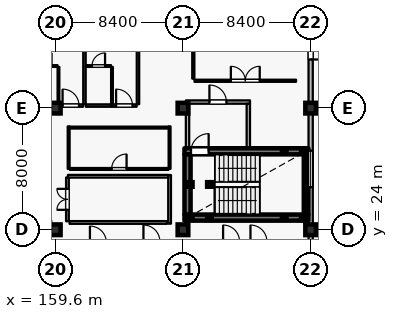
"""IFC4 building model, lengths in metres.
Left out: names, types, materials, properties, quantities, classifications, styles, units other than length and angle.
Written with IfcOpenShell. Run it as: python <this file> out.ifc"""

import sys

from ifc_helpers import new_model, si_unit, direction, frame, frame_2d, origin, origin_2d, place, context, subcontext, project, spatial, rectangle, hollow_rectangle, extrude, element, fill, save


model = new_model("IFC4")
c1 = context("Model", 3, precision=1e-05, world=origin(), true_north=direction((0.0, 1.0)))
c2 = subcontext(c1, "Body", "Model", "MODEL_VIEW")
j1 = project(units=[si_unit("LENGTHUNIT", "METRE"), si_unit("PLANEANGLEUNIT", "RADIAN")], contexts=[c1])
p1 = place(None, origin())
s1 = spatial("IfcSite", under=j1, at=p1, CompositionType="ELEMENT")
p2 = place(p1, origin())
s2 = spatial("IfcBuilding", under=s1, at=p2, CompositionType="ELEMENT")
p3 = place(p2, frame((0.0, 0.0, 28.8)))
s3 = spatial("IfcBuildingStorey", under=s2, at=p3, CompositionType="ELEMENT", Elevation=28.8)
for number, where, z_axis, x_axis in (
    (1, (159.6, 24.0, 0.0), (0.0, 0.0, 1.0), (1.0, 0.0, 0.0)),
    (2, (168.0, 32.0, 0.0), (0.0, 0.0, 1.0), (1.0, 0.0, 0.0)),
    (3, (176.4, 32.0, 0.0), (0.0, 0.0, 1.0), (1.0, 0.0, 0.0)),
    (4, (159.6, 32.0, 0.0), (0.0, 0.0, 1.0), (1.0, 0.0, 0.0)),
    (5, (168.0, 24.0, 0.0), (0.0, 0.0, 1.0), (1.0, 0.0, 0.0)),
    (6, (176.4, 24.0, 0.0), (0.0, 0.0, 1.0), (1.0, 0.0, 0.0)),
):
    element("IfcColumn", number, at=place(p3, frame(where, z_axis=z_axis, x_axis=x_axis)), inside=s3, PredefinedType="COLUMN", context=c2, shape_type="SweptSolid", body=[
        extrude(rectangle(XDim=0.7, YDim=0.7, at=origin_2d()), origin(), (0.0, 0.0, 1.0), 3.6),
    ])
p4 = place(p3, frame((176.4, 39.65, 0.0), z_axis=(0.0, 0.0, 1.0), x_axis=(0.0, -1.0, 0.0)))
e7 = element("IfcWall", 7, at=p4, inside=s3, PredefinedType="SOLIDWALL", context=c2, shape_type="SweptSolid", body=[
    extrude(rectangle(XDim=7.3, YDim=0.28, at=frame_2d((3.65, 0.0))), origin(), (0.0, 0.0, 1.0), 2.7),
])
p5 = place(p4, frame((2.85, 0.0, 0.0)))
e8 = element("IfcOpeningElement", 8, at=p5, cuts=e7, PredefinedType="OPENING", context=c2, shape_type="SweptSolid", body=[
    extrude(rectangle(XDim=1.6, YDim=2.25, at=frame_2d((0.8, 1.125))), frame((0.0, 0.15, 0.0), z_axis=(0.0, -1.0, 0.0), x_axis=(1.0, 0.0, 0.0)), (0.0, 0.0, 1.0), 0.3),
])
p6 = place(p3, frame((176.4, 31.65, 0.0), z_axis=(0.0, 0.0, 1.0), x_axis=(0.0, -1.0, 0.0)))
e9 = element("IfcWall", 9, at=p6, inside=s3, PredefinedType="SOLIDWALL", context=c2, shape_type="SweptSolid", body=[
    extrude(rectangle(XDim=7.3, YDim=0.28, at=frame_2d((3.65, 0.0))), origin(), (0.0, 0.0, 1.0), 2.7),
])
p7 = place(p6, frame((2.45, 0.0, 0.5)))
e10 = element("IfcOpeningElement", 10, at=p7, cuts=e9, PredefinedType="OPENING", context=c2, shape_type="SweptSolid", body=[
    extrude(rectangle(XDim=2.4, YDim=1.65, at=frame_2d((1.2, 0.825))), frame((0.0, 0.15, 0.0), z_axis=(0.0, -1.0, 0.0), x_axis=(1.0, 0.0, 0.0)), (0.0, 0.0, 1.0), 0.3),
])
p8 = place(p3, frame((176.4, 23.65, 0.0), z_axis=(0.0, 0.0, 1.0), x_axis=(0.0, -1.0, 0.0)))
e11 = element("IfcWall", 11, at=p8, inside=s3, PredefinedType="SOLIDWALL", context=c2, shape_type="SweptSolid", body=[
    extrude(rectangle(XDim=7.3, YDim=0.28, at=frame_2d((3.65, 0.0))), origin(), (0.0, 0.0, 1.0), 2.7),
])
p9 = place(p8, frame((2.45, 0.0, 0.5)))
e12 = element("IfcOpeningElement", 12, at=p9, cuts=e11, PredefinedType="OPENING", context=c2, shape_type="SweptSolid", body=[
    extrude(rectangle(XDim=2.4, YDim=1.65, at=frame_2d((1.2, 0.825))), frame((0.0, 0.15, 0.0), z_axis=(0.0, -1.0, 0.0), x_axis=(1.0, 0.0, 0.0)), (0.0, 0.0, 1.0), 0.3),
])
p10 = place(p3, frame((168.1, 24.8, 0.0), z_axis=(0.0, 0.0, 1.0), x_axis=(1.0, 0.0, 0.0)))
e13 = element("IfcWall", 13, at=p10, inside=s3, PredefinedType="SHEAR", context=c2, shape_type="SweptSolid", body=[
    extrude(rectangle(XDim=8.15, YDim=0.4, at=frame_2d((4.075, 0.0))), origin(), (0.0, 0.0, 1.0), 3.365),
])
p11 = place(p3, frame((176.1, 25.005, 0.0), z_axis=(0.0, 0.0, 1.0), x_axis=(0.0, 1.0, 0.0)))
e14 = element("IfcWall", 14, at=p11, inside=s3, PredefinedType="SHEAR", context=c2, shape_type="SweptSolid", body=[
    extrude(rectangle(XDim=3.95, YDim=0.3, at=frame_2d((1.975, 0.0))), origin(), (0.0, 0.0, 1.0), 3.365),
])
p12 = place(p3, frame((168.1, 29.16, 0.0), z_axis=(0.0, 0.0, 1.0), x_axis=(1.0, 0.0, 0.0)))
e15 = element("IfcWall", 15, at=p12, inside=s3, PredefinedType="SHEAR", context=c2, shape_type="SweptSolid", body=[
    extrude(rectangle(XDim=8.15, YDim=0.4, at=frame_2d((4.075, 0.0))), origin(), (0.0, 0.0, 1.0), 3.365),
])
p13 = place(p12, frame((0.43, 0.0, 0.0)))
e16 = element("IfcOpeningElement", 16, at=p13, cuts=e15, PredefinedType="OPENING", context=c2, shape_type="SweptSolid", body=[
    extrude(rectangle(XDim=1.16, YDim=2.2, at=frame_2d((0.58, 1.1))), frame((0.0, 0.21, 0.0), z_axis=(0.0, -1.0, 0.0), x_axis=(1.0, 0.0, 0.0)), (0.0, 0.0, 1.0), 0.42),
])
p14 = place(p3, frame((168.3, 25.005, 0.0), z_axis=(0.0, 0.0, 1.0), x_axis=(0.0, 1.0, 0.0)))
e17 = element("IfcWall", 17, at=p14, inside=s3, PredefinedType="SHEAR", context=c2, shape_type="SweptSolid", body=[
    extrude(rectangle(XDim=3.95, YDim=0.4, at=frame_2d((1.975, 0.0))), origin(), (0.0, 0.0, 1.0), 3.365),
])
p15 = place(p3, frame((168.3, 29.365, 0.0), z_axis=(0.0, 0.0, 1.0), x_axis=(0.0, 1.0, 0.0)))
e18 = element("IfcWall", 18, at=p15, inside=s3, PredefinedType="PARTITIONING", context=c2, shape_type="SweptSolid", body=[
    extrude(rectangle(XDim=2.92, YDim=0.22, at=frame_2d((1.46, 0.0))), origin(), (0.0, 0.0, 1.0), 3.365),
])
p16 = place(p3, frame((168.19, 32.4, 0.0), z_axis=(0.0, 0.0, 1.0), x_axis=(1.0, 0.0, 0.0)))
e19 = element("IfcWall", 19, at=p16, inside=s3, PredefinedType="PARTITIONING", context=c2, shape_type="SweptSolid", body=[
    extrude(rectangle(XDim=4.22, YDim=0.22, at=frame_2d((2.11, 0.0))), origin(), (0.0, 0.0, 1.0), 3.365),
])
p17 = place(p16, frame((1.55, 0.0, 0.0)))
e20 = element("IfcOpeningElement", 20, at=p17, cuts=e19, PredefinedType="OPENING", context=c2, shape_type="SweptSolid", body=[
    extrude(rectangle(XDim=1.12, YDim=2.2, at=frame_2d((0.56, 1.1))), frame((0.0, 0.12, 0.0), z_axis=(0.0, -1.0, 0.0), x_axis=(1.0, 0.0, 0.0)), (0.0, 0.0, 1.0), 0.24),
])
p18 = place(p3, frame((172.3, 29.365, 0.0), z_axis=(0.0, 0.0, 1.0), x_axis=(0.0, 1.0, 0.0)))
e21 = element("IfcWall", 21, at=p18, inside=s3, PredefinedType="PARTITIONING", context=c2, shape_type="SweptSolid", body=[
    extrude(rectangle(XDim=2.92, YDim=0.22, at=frame_2d((1.46, 0.0))), origin(), (0.0, 0.0, 1.0), 3.365),
])
for number, where, z_axis, x_axis in (
    (22, (168.48, 24.8, 0.0), (0.0, 0.0, 1.0), (1.0, 0.0, 0.0)),
    (23, (168.48, 26.98, 0.0), (0.0, 0.0, 1.0), (1.0, 0.0, 0.0)),
    (24, (169.74, 24.8, 0.0), (0.0, 0.0, 1.0), (1.0, 0.0, 0.0)),
    (25, (169.74, 26.98, 0.0), (0.0, 0.0, 1.0), (1.0, 0.0, 0.0)),
    (26, (174.66, 24.8, -1.8), (0.0, 0.0, 1.0), (1.0, 0.0, 0.0)),
    (27, (174.66, 29.16, -1.8), (0.0, 0.0, 1.0), (1.0, 0.0, 0.0)),
    (28, (175.92, 24.8, -1.8), (0.0, 0.0, 1.0), (1.0, 0.0, 0.0)),
    (29, (175.92, 29.16, -1.8), (0.0, 0.0, 1.0), (1.0, 0.0, 0.0)),
):
    element("IfcColumn", number, at=place(p3, frame(where, z_axis=z_axis, x_axis=x_axis)), inside=s3, PredefinedType="COLUMN", context=c2, shape_type="SweptSolid", body=[
        extrude(hollow_rectangle(XDim=0.3, YDim=0.3, WallThickness=0.012, at=origin_2d()), origin(), (0.0, 0.0, 1.0), 3.42),
    ])
p19 = place(p3, frame((158.09, 32.17, 0.0), z_axis=(0.0, 0.0, 1.0), x_axis=(1.0, 0.0, 0.0)))
e30 = element("IfcWall", 30, at=p19, inside=s3, PredefinedType="PARTITIONING", context=c2, shape_type="SweptSolid", body=[
    extrude(rectangle(XDim=1.71, YDim=0.16, at=frame_2d((0.855, 0.0))), origin(), (0.0, 0.0, 1.0), 3.365),
])
p20 = place(p3, frame((159.81, 32.17, 0.0), z_axis=(0.0, 0.0, 1.0), x_axis=(1.0, 0.0, 0.0)))
e31 = element("IfcWall", 31, at=p20, inside=s3, PredefinedType="PARTITIONING", context=c2, shape_type="SweptSolid", body=[
    extrude(rectangle(XDim=1.62, YDim=0.16, at=frame_2d((0.81, 0.0))), origin(), (0.0, 0.0, 1.0), 3.365),
])
p21 = place(p20, frame((0.27, 0.0, 0.0)))
e32 = element("IfcOpeningElement", 32, at=p21, cuts=e31, PredefinedType="OPENING", context=c2, shape_type="SweptSolid", body=[
    extrude(rectangle(XDim=1.08, YDim=2.3, at=frame_2d((0.54, 1.15))), frame((0.0, 0.09, 0.0), z_axis=(0.0, -1.0, 0.0), x_axis=(1.0, 0.0, 0.0)), (0.0, 0.0, 1.0), 0.18),
])
p22 = place(p3, frame((159.81, 32.26, 0.0), z_axis=(0.0, 0.0, 1.0), x_axis=(0.0, 1.0, 0.0)))
e33 = element("IfcWall", 33, at=p22, inside=s3, PredefinedType="PARTITIONING", context=c2, shape_type="SweptSolid", body=[
    extrude(rectangle(XDim=2.45, YDim=0.115, at=frame_2d((1.225, 0.0))), origin(), (0.0, 0.0, 1.0), 2.73),
])
p23 = place(p3, frame((158.1, 34.77, 0.0), z_axis=(0.0, 0.0, 1.0), x_axis=(1.0, 0.0, 0.0)))
e34 = element("IfcWall", 34, at=p23, inside=s3, PredefinedType="PARTITIONING", context=c2, shape_type="SweptSolid", body=[
    extrude(rectangle(XDim=1.65, YDim=0.115, at=frame_2d((0.825, 0.0))), origin(), (0.0, 0.0, 1.0), 3.365),
])
p24 = place(p23, frame((0.395, 0.0, 0.0)))
e35 = element("IfcOpeningElement", 35, at=p24, cuts=e34, PredefinedType="OPENING", context=c2, shape_type="SweptSolid", body=[
    extrude(rectangle(XDim=0.86, YDim=2.12, at=frame_2d((0.43, 1.06))), frame((0.0, 0.067, 0.0), z_axis=(0.0, -1.0, 0.0), x_axis=(1.0, 0.0, 0.0)), (0.0, 0.0, 1.0), 0.135),
])
p25 = place(p3, frame((161.61, 32.17, 0.0), z_axis=(0.0, 0.0, 1.0), x_axis=(1.0, 0.0, 0.0)))
e36 = element("IfcWall", 36, at=p25, inside=s3, PredefinedType="PARTITIONING", context=c2, shape_type="SweptSolid", body=[
    extrude(rectangle(XDim=1.71, YDim=0.16, at=frame_2d((0.855, 0.0))), origin(), (0.0, 0.0, 1.0), 3.365),
])
p26 = place(p3, frame((163.33, 32.17, 0.0), z_axis=(0.0, 0.0, 1.0), x_axis=(1.0, 0.0, 0.0)))
e37 = element("IfcWall", 37, at=p26, inside=s3, PredefinedType="PARTITIONING", context=c2, shape_type="SweptSolid", body=[
    extrude(rectangle(XDim=1.62, YDim=0.16, at=frame_2d((0.81, 0.0))), origin(), (0.0, 0.0, 1.0), 3.365),
])
p27 = place(p26, frame((0.27, 0.0, 0.0)))
e38 = element("IfcOpeningElement", 38, at=p27, cuts=e37, PredefinedType="OPENING", context=c2, shape_type="SweptSolid", body=[
    extrude(rectangle(XDim=1.08, YDim=2.3, at=frame_2d((0.54, 1.15))), frame((0.0, 0.09, 0.0), z_axis=(0.0, -1.0, 0.0), x_axis=(1.0, 0.0, 0.0)), (0.0, 0.0, 1.0), 0.18),
])
p28 = place(p3, frame((163.33, 32.26, 0.0), z_axis=(0.0, 0.0, 1.0), x_axis=(0.0, 1.0, 0.0)))
e39 = element("IfcWall", 39, at=p28, inside=s3, PredefinedType="PARTITIONING", context=c2, shape_type="SweptSolid", body=[
    extrude(rectangle(XDim=2.45, YDim=0.115, at=frame_2d((1.225, 0.0))), origin(), (0.0, 0.0, 1.0), 3.365),
])
p29 = place(p3, frame((161.62, 34.77, 0.0), z_axis=(0.0, 0.0, 1.0), x_axis=(1.0, 0.0, 0.0)))
e40 = element("IfcWall", 40, at=p29, inside=s3, PredefinedType="PARTITIONING", context=c2, shape_type="SweptSolid", body=[
    extrude(rectangle(XDim=1.65, YDim=0.115, at=frame_2d((0.825, 0.0))), origin(), (0.0, 0.0, 1.0), 3.365),
])
p30 = place(p29, frame((0.395, 0.0, 0.0)))
e41 = element("IfcOpeningElement", 41, at=p30, cuts=e40, PredefinedType="OPENING", context=c2, shape_type="SweptSolid", body=[
    extrude(rectangle(XDim=0.86, YDim=2.12, at=frame_2d((0.43, 1.06))), frame((0.0, 0.067, 0.0), z_axis=(0.0, -1.0, 0.0), x_axis=(1.0, 0.0, 0.0)), (0.0, 0.0, 1.0), 0.135),
])
p31 = place(p3, frame((161.52, 32.26, 0.0), z_axis=(0.0, 0.0, 1.0), x_axis=(0.0, 1.0, 0.0)))
e42 = element("IfcWall", 42, at=p31, inside=s3, PredefinedType="PARTITIONING", context=c2, shape_type="SweptSolid", body=[
    extrude(rectangle(XDim=9.23, YDim=0.16, at=frame_2d((4.615, 0.0))), origin(), (0.0, 0.0, 1.0), 3.365),
])
p32 = place(p3, frame((165.04, 32.26, 0.0), z_axis=(0.0, 0.0, 1.0), x_axis=(0.0, 1.0, 0.0)))
e43 = element("IfcWall", 43, at=p32, inside=s3, PredefinedType="PARTITIONING", context=c2, shape_type="SweptSolid", body=[
    extrude(rectangle(XDim=8.64, YDim=0.16, at=frame_2d((4.32, 0.0))), origin(), (0.0, 0.0, 1.0), 3.365),
])
p33 = place(p3, frame((160.4, 24.56, 0.0), z_axis=(0.0, 0.0, 1.0), x_axis=(0.0, 1.0, 0.0)))
e44 = element("IfcWall", 44, at=p33, inside=s3, PredefinedType="PARTITIONING", context=c2, shape_type="SweptSolid", body=[
    extrude(rectangle(XDim=2.88, YDim=0.18, at=frame_2d((1.44, 0.0))), origin(), (0.0, 0.0, 1.0), 3.365),
])
p34 = place(p33, frame((0.75, 0.0, 0.0)))
e45 = element("IfcOpeningElement", 45, at=p34, cuts=e44, PredefinedType="OPENING", context=c2, shape_type="SweptSolid", body=[
    extrude(rectangle(XDim=1.38, YDim=2.3, at=frame_2d((0.69, 1.15))), frame((0.0, 0.1, 0.0), z_axis=(0.0, -1.0, 0.0), x_axis=(1.0, 0.0, 0.0)), (0.0, 0.0, 1.0), 0.2),
])
p35 = place(p3, frame((160.54, 24.48, 0.0), z_axis=(0.0, 0.0, 1.0), x_axis=(1.0, 0.0, 0.0)))
e46 = element("IfcWall", 46, at=p35, inside=s3, PredefinedType="PARTITIONING", context=c2, shape_type="SweptSolid", body=[
    extrude(rectangle(XDim=6.41, YDim=0.18, at=frame_2d((3.205, 0.0))), origin(), (0.0, 0.0, 1.0), 3.365),
])
p36 = place(p3, frame((160.56, 28.0, 0.0), z_axis=(0.0, 0.0, 1.0), x_axis=(1.0, 0.0, 0.0)))
e47 = element("IfcWall", 47, at=p36, inside=s3, PredefinedType="PARTITIONING", context=c2, shape_type="SweptSolid", body=[
    extrude(rectangle(XDim=6.48, YDim=0.125, at=frame_2d((3.24, 0.0))), origin(), (0.0, 0.0, 1.0), 3.365),
])
p37 = place(p36, frame((2.75, 0.0, 0.0)))
e48 = element("IfcOpeningElement", 48, at=p37, cuts=e47, PredefinedType="OPENING", context=c2, shape_type="SweptSolid", body=[
    extrude(rectangle(XDim=0.98, YDim=2.15, at=frame_2d((0.49, 1.075))), frame((0.0, 0.073, 0.0), z_axis=(0.0, -1.0, 0.0), x_axis=(1.0, 0.0, 0.0)), (0.0, 0.0, 1.0), 0.145),
])
p38 = place(p3, frame((168.76, 33.8, 0.0), z_axis=(0.0, 0.0, 1.0), x_axis=(1.0, 0.0, 0.0)))
e49 = element("IfcWall", 49, at=p38, inside=s3, PredefinedType="PARTITIONING", context=c2, shape_type="SweptSolid", body=[
    extrude(rectangle(XDim=6.68, YDim=0.14, at=frame_2d((3.34, 0.0))), origin(), (0.0, 0.0, 1.0), 3.365),
])
p39 = place(p38, frame((2.39, 0.0, 0.0)))
e50 = element("IfcOpeningElement", 50, at=p39, cuts=e49, PredefinedType="OPENING", context=c2, shape_type="SweptSolid", body=[
    extrude(rectangle(XDim=1.9, YDim=2.4, at=frame_2d((0.95, 1.2))), frame((0.0, 0.08, 0.0), z_axis=(0.0, -1.0, 0.0), x_axis=(1.0, 0.0, 0.0)), (0.0, 0.0, 1.0), 0.16),
])
p40 = place(p3, frame((168.68, 33.94, 0.0), z_axis=(0.0, 0.0, 1.0), x_axis=(0.0, 1.0, 0.0)))
e51 = element("IfcWall", 51, at=p40, inside=s3, PredefinedType="PARTITIONING", context=c2, shape_type="SweptSolid", body=[
    extrude(rectangle(XDim=4.61, YDim=0.14, at=frame_2d((2.305, 0.0))), origin(), (0.0, 0.0, 1.0), 3.365),
])
p41 = place(p3, frame((167.12, 24.4, 0.0), z_axis=(0.0, 0.0, 1.0), x_axis=(0.0, 1.0, 0.0)))
e52 = element("IfcWall", 52, at=p41, inside=s3, PredefinedType="PARTITIONING", context=c2, shape_type="SweptSolid", body=[
    extrude(rectangle(XDim=3.2, YDim=0.18, at=frame_2d((1.6, 0.0))), origin(), (0.0, 0.0, 1.0), 3.365),
])
p42 = place(p3, frame((160.432, 27.52, 0.0), z_axis=(0.0, 0.0, 1.0), x_axis=(1.0, 0.0, 0.0)))
e53 = element("IfcWall", 53, at=p42, inside=s3, PredefinedType="PARTITIONING", context=c2, shape_type="SweptSolid", body=[
    extrude(rectangle(XDim=6.598, YDim=0.18, at=frame_2d((3.299, 0.0))), origin(), (0.0, 0.0, 1.0), 3.365),
])
for number, where, z_axis, x_axis in (
    (54, (160.48, 28.004, 0.0), (0.0, 0.0, 1.0), (0.0, 1.0, 0.0)),
    (55, (167.12, 28.004, 0.0), (0.0, 0.0, 1.0), (0.0, 1.0, 0.0)),
):
    element("IfcWall", number, at=place(p3, frame(where, z_axis=z_axis, x_axis=x_axis)), inside=s3, PredefinedType="PARTITIONING", context=c2, shape_type="SweptSolid", body=[
        extrude(rectangle(XDim=2.796, YDim=0.125, at=frame_2d((1.398, 0.0))), origin(), (0.0, 0.0, 1.0), 3.365),
    ])
p43 = place(p3, frame((160.543, 30.72, 0.0), z_axis=(0.0, 0.0, 1.0), x_axis=(1.0, 0.0, 0.0)))
e56 = element("IfcWall", 56, at=p43, inside=s3, PredefinedType="PARTITIONING", context=c2, shape_type="SweptSolid", body=[
    extrude(rectangle(XDim=6.514, YDim=0.125, at=frame_2d((3.257, 0.0))), origin(), (0.0, 0.0, 1.0), 3.365),
])
p44 = place(p5, origin())
e57 = element("IfcDoor", 57, at=p44, inside=s3, OperationType="DOUBLE_DOOR_SINGLE_SWING", PredefinedType="DOOR", context=c2, shape_type="SweptSolid", body=[
    extrude(rectangle(XDim=1.6, YDim=2.25, at=frame_2d((0.8, 1.125))), frame((0.0, 0.025, 0.0), z_axis=(0.0, -1.0, 0.0), x_axis=(1.0, 0.0, 0.0)), (0.0, 0.0, 1.0), 0.05),
])
fill(e8, e57)
p45 = place(p7, origin())
e58 = element("IfcWindow", 58, at=p45, inside=s3, PartitioningType="DOUBLE_PANEL_VERTICAL", PredefinedType="WINDOW", context=c2, shape_type="SweptSolid", body=[
    extrude(rectangle(XDim=2.4, YDim=1.65, at=frame_2d((1.2, 0.825))), frame((0.0, 0.03, 0.0), z_axis=(0.0, -1.0, 0.0), x_axis=(1.0, 0.0, 0.0)), (0.0, 0.0, 1.0), 0.06),
])
fill(e10, e58)
p46 = place(p13, origin())
e59 = element("IfcDoor", 59, at=p46, inside=s3, OperationType="SINGLE_SWING_RIGHT", PredefinedType="DOOR", context=c2, shape_type="SweptSolid", body=[
    extrude(rectangle(XDim=1.16, YDim=2.2, at=frame_2d((0.58, 1.1))), frame((0.0, 0.025, 0.0), z_axis=(0.0, -1.0, 0.0), x_axis=(1.0, 0.0, 0.0)), (0.0, 0.0, 1.0), 0.05),
])
fill(e16, e59)
p47 = place(p17, origin())
e60 = element("IfcDoor", 60, at=p47, inside=s3, OperationType="SINGLE_SWING_LEFT", PredefinedType="DOOR", context=c2, shape_type="SweptSolid", body=[
    extrude(rectangle(XDim=1.12, YDim=2.2, at=frame_2d((0.56, 1.1))), frame((0.0, 0.025, 0.0), z_axis=(0.0, -1.0, 0.0), x_axis=(1.0, 0.0, 0.0)), (0.0, 0.0, 1.0), 0.05),
])
fill(e20, e60)
p48 = place(p21, origin())
e61 = element("IfcDoor", 61, at=p48, inside=s3, OperationType="SINGLE_SWING_LEFT", PredefinedType="DOOR", context=c2, shape_type="SweptSolid", body=[
    extrude(rectangle(XDim=1.08, YDim=2.3, at=frame_2d((0.54, 1.15))), frame((0.0, 0.025, 0.0), z_axis=(0.0, -1.0, 0.0), x_axis=(1.0, 0.0, 0.0)), (0.0, 0.0, 1.0), 0.05),
])
fill(e32, e61)
p49 = place(p27, origin())
e62 = element("IfcDoor", 62, at=p49, inside=s3, OperationType="SINGLE_SWING_LEFT", PredefinedType="DOOR", context=c2, shape_type="SweptSolid", body=[
    extrude(rectangle(XDim=1.08, YDim=2.3, at=frame_2d((0.54, 1.15))), frame((0.0, 0.025, 0.0), z_axis=(0.0, -1.0, 0.0), x_axis=(1.0, 0.0, 0.0)), (0.0, 0.0, 1.0), 0.05),
])
fill(e38, e62)
p50 = place(p30, origin())
e63 = element("IfcDoor", 63, at=p50, inside=s3, OperationType="SINGLE_SWING_RIGHT", PredefinedType="DOOR", context=c2, shape_type="SweptSolid", body=[
    extrude(rectangle(XDim=0.86, YDim=2.12, at=frame_2d((0.43, 1.06))), frame((0.0, 0.025, 0.0), z_axis=(0.0, -1.0, 0.0), x_axis=(1.0, 0.0, 0.0)), (0.0, 0.0, 1.0), 0.05),
])
fill(e41, e63)
p51 = place(p34, origin())
e64 = element("IfcDoor", 64, at=p51, inside=s3, OperationType="DOUBLE_DOOR_SINGLE_SWING", PredefinedType="DOOR", context=c2, shape_type="SweptSolid", body=[
    extrude(rectangle(XDim=1.38, YDim=2.3, at=frame_2d((0.69, 1.15))), frame((0.0, 0.025, 0.0), z_axis=(0.0, -1.0, 0.0), x_axis=(1.0, 0.0, 0.0)), (0.0, 0.0, 1.0), 0.05),
])
fill(e45, e64)
p52 = place(p37, origin())
e65 = element("IfcDoor", 65, at=p52, inside=s3, OperationType="SINGLE_SWING_RIGHT", PredefinedType="DOOR", context=c2, shape_type="SweptSolid", body=[
    extrude(rectangle(XDim=0.98, YDim=2.15, at=frame_2d((0.49, 1.075))), frame((0.0, 0.025, 0.0), z_axis=(0.0, -1.0, 0.0), x_axis=(1.0, 0.0, 0.0)), (0.0, 0.0, 1.0), 0.05),
])
fill(e48, e65)
p53 = place(p39, origin())
e66 = element("IfcDoor", 66, at=p53, inside=s3, OperationType="DOUBLE_DOOR_SINGLE_SWING", PredefinedType="DOOR", context=c2, shape_type="SweptSolid", body=[
    extrude(rectangle(XDim=1.9, YDim=2.4, at=frame_2d((0.95, 1.2))), frame((0.0, 0.025, 0.0), z_axis=(0.0, -1.0, 0.0), x_axis=(1.0, 0.0, 0.0)), (0.0, 0.0, 1.0), 0.05),
])
fill(e50, e66)
save(model, sys.argv[1])
